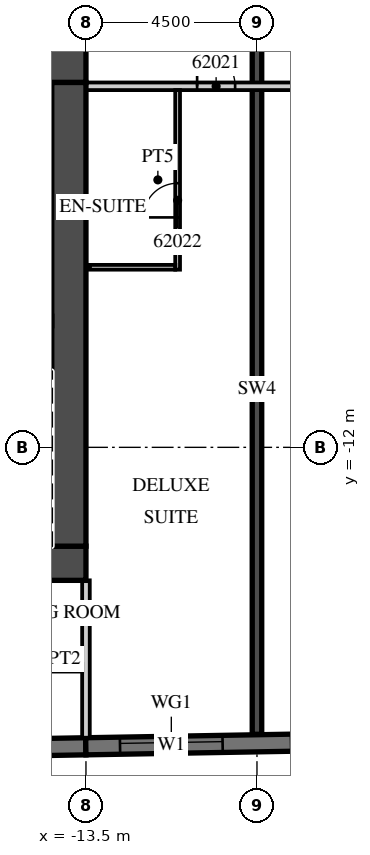
"""IFC4 building model, lengths in metres.
Left out: names, types, materials, properties, quantities, classifications, styles, units other than length and angle.
Written with IfcOpenShell. Run it as: python <this file> out.ifc"""

import sys

from ifc_helpers import new_model, si_unit, direction, frame, frame_2d, origin, place, context, subcontext, project, spatial, rectangle, extrude, element, fill, save


model = new_model("IFC4")
c1 = context("Model", 3, precision=1e-05, world=origin(), true_north=direction((0.0, 1.0)))
c2 = subcontext(c1, "Body", "Model", "MODEL_VIEW")
j1 = project(units=[si_unit("LENGTHUNIT", "METRE"), si_unit("PLANEANGLEUNIT", "RADIAN")], contexts=[c1])
p1 = place(None, origin())
s1 = spatial("IfcSite", under=j1, at=p1, CompositionType="ELEMENT")
p2 = place(p1, origin())
s2 = spatial("IfcBuilding", under=s1, at=p2, CompositionType="ELEMENT")
p3 = place(p2, frame((0.0, 0.0, 250.7)))
s3 = spatial("IfcBuildingStorey", under=s2, at=p3, CompositionType="ELEMENT", Elevation=250.7)
p4 = place(p3, frame((-9.0, -19.55, 0.0), z_axis=(0.0, 0.0, 1.0), x_axis=(0.0, 1.0, 0.0)))
e1 = element("IfcWall", 1, at=p4, inside=s3, PredefinedType="SHEAR", context=c2, shape_type="SweptSolid", body=[
    extrude(rectangle(XDim=18.15, YDim=0.25, at=frame_2d((9.075, 0.0))), origin(), (0.0, 0.0, 1.0), 3.3),
])
p5 = place(p3, frame((-31.504, -20.18, 0.0), z_axis=(0.0, 0.0, 1.0), x_axis=(0.999847677887, 0.017453395744, 0.0)))
e2 = element("IfcWall", 2, at=p5, inside=s3, PredefinedType="SOLIDWALL", context=c2, shape_type="SweptSolid", body=[
    extrude(rectangle(XDim=18.003, YDim=0.45, at=frame_2d((9.001, 0.0))), origin(), (0.0, 0.0, 1.0), 3.02),
])
p6 = place(p3, frame((-13.504, -19.866, 0.0), z_axis=(0.0, 0.0, 1.0), x_axis=(0.999847672978, 0.017453676992, 0.0)))
e3 = element("IfcWall", 3, at=p6, inside=s3, PredefinedType="SOLIDWALL", context=c2, shape_type="SweptSolid", body=[
    extrude(rectangle(XDim=52.86, YDim=0.45, at=frame_2d((26.43, 0.0))), origin(), (0.0, 0.0, 1.0), 3.02),
])
p7 = place(p6, frame((0.9, 0.0, 0.45)))
e4 = element("IfcOpeningElement", 4, at=p7, cuts=e3, PredefinedType="OPENING", context=c2, shape_type="SweptSolid", body=[
    extrude(rectangle(XDim=2.7, YDim=2.25, at=frame_2d((1.35, 1.125))), frame((0.0, 0.235, 0.0), z_axis=(0.0, -1.0, 0.0), x_axis=(1.0, 0.0, 0.0)), (0.0, 0.0, 1.0), 0.47),
])
p8 = place(p6, frame((5.401, 0.0, 0.45)))
e5 = element("IfcOpeningElement", 5, at=p8, cuts=e3, PredefinedType="OPENING", context=c2, shape_type="SweptSolid", body=[
    extrude(rectangle(XDim=2.7, YDim=2.25, at=frame_2d((1.35, 1.125))), frame((0.0, 0.235, 0.0), z_axis=(0.0, -1.0, 0.0), x_axis=(1.0, 0.0, 0.0)), (0.0, 0.0, 1.0), 0.47),
])
p9 = place(p6, frame((9.902, 0.0, 0.45)))
e6 = element("IfcOpeningElement", 6, at=p9, cuts=e3, PredefinedType="OPENING", context=c2, shape_type="SweptSolid", body=[
    extrude(rectangle(XDim=2.7, YDim=2.25, at=frame_2d((1.35, 1.125))), frame((0.0, 0.235, 0.0), z_axis=(0.0, -1.0, 0.0), x_axis=(1.0, 0.0, 0.0)), (0.0, 0.0, 1.0), 0.47),
])
p10 = place(p6, frame((14.402, 0.0, 0.45)))
e7 = element("IfcOpeningElement", 7, at=p10, cuts=e3, PredefinedType="OPENING", context=c2, shape_type="SweptSolid", body=[
    extrude(rectangle(XDim=2.7, YDim=2.25, at=frame_2d((1.35, 1.125))), frame((0.0, 0.235, 0.0), z_axis=(0.0, -1.0, 0.0), x_axis=(1.0, 0.0, 0.0)), (0.0, 0.0, 1.0), 0.47),
])
p11 = place(p6, frame((18.903, 0.0, 0.45)))
e8 = element("IfcOpeningElement", 8, at=p11, cuts=e3, PredefinedType="OPENING", context=c2, shape_type="SweptSolid", body=[
    extrude(rectangle(XDim=2.7, YDim=2.25, at=frame_2d((1.35, 1.125))), frame((0.0, 0.235, 0.0), z_axis=(0.0, -1.0, 0.0), x_axis=(1.0, 0.0, 0.0)), (0.0, 0.0, 1.0), 0.47),
])
p12 = place(p6, frame((23.404, 0.0, 0.45)))
e9 = element("IfcOpeningElement", 9, at=p12, cuts=e3, PredefinedType="OPENING", context=c2, shape_type="SweptSolid", body=[
    extrude(rectangle(XDim=2.7, YDim=2.25, at=frame_2d((1.35, 1.125))), frame((0.0, 0.235, 0.0), z_axis=(0.0, -1.0, 0.0), x_axis=(1.0, 0.0, 0.0)), (0.0, 0.0, 1.0), 0.47),
])
p13 = place(p6, frame((27.904, 0.0, 0.45)))
e10 = element("IfcOpeningElement", 10, at=p13, cuts=e3, PredefinedType="OPENING", context=c2, shape_type="SweptSolid", body=[
    extrude(rectangle(XDim=2.7, YDim=2.25, at=frame_2d((1.35, 1.125))), frame((0.0, 0.235, 0.0), z_axis=(0.0, -1.0, 0.0), x_axis=(1.0, 0.0, 0.0)), (0.0, 0.0, 1.0), 0.47),
])
p14 = place(p6, frame((32.405, 0.0, 0.45)))
e11 = element("IfcOpeningElement", 11, at=p14, cuts=e3, PredefinedType="OPENING", context=c2, shape_type="SweptSolid", body=[
    extrude(rectangle(XDim=2.7, YDim=2.25, at=frame_2d((1.35, 1.125))), frame((0.0, 0.235, 0.0), z_axis=(0.0, -1.0, 0.0), x_axis=(1.0, 0.0, 0.0)), (0.0, 0.0, 1.0), 0.47),
])
p15 = place(p6, frame((36.906, 0.0, 0.45)))
e12 = element("IfcOpeningElement", 12, at=p15, cuts=e3, PredefinedType="OPENING", context=c2, shape_type="SweptSolid", body=[
    extrude(rectangle(XDim=2.7, YDim=2.25, at=frame_2d((1.35, 1.125))), frame((0.0, 0.235, 0.0), z_axis=(0.0, -1.0, 0.0), x_axis=(1.0, 0.0, 0.0)), (0.0, 0.0, 1.0), 0.47),
])
p16 = place(p6, frame((41.406, 0.0, 0.45)))
e13 = element("IfcOpeningElement", 13, at=p16, cuts=e3, PredefinedType="OPENING", context=c2, shape_type="SweptSolid", body=[
    extrude(rectangle(XDim=2.7, YDim=2.25, at=frame_2d((1.35, 1.125))), frame((0.0, 0.235, 0.0), z_axis=(0.0, -1.0, 0.0), x_axis=(1.0, 0.0, 0.0)), (0.0, 0.0, 1.0), 0.47),
])
p17 = place(p6, frame((45.907, 0.0, 0.45)))
e14 = element("IfcOpeningElement", 14, at=p17, cuts=e3, PredefinedType="OPENING", context=c2, shape_type="SweptSolid", body=[
    extrude(rectangle(XDim=2.7, YDim=2.25, at=frame_2d((1.35, 1.125))), frame((0.0, 0.235, 0.0), z_axis=(0.0, -1.0, 0.0), x_axis=(1.0, 0.0, 0.0)), (0.0, 0.0, 1.0), 0.47),
])
p18 = place(p3, frame((-13.5, -19.641, 0.0), z_axis=(0.0, 0.0, 1.0), x_axis=(0.0, 1.0, 0.0)))
e15 = element("IfcWall", 15, at=p18, inside=s3, PredefinedType="PARTITIONING", context=c2, shape_type="SweptSolid", body=[
    extrude(rectangle(XDim=4.141, YDim=0.2, at=frame_2d((2.071, 0.0))), origin(), (0.0, 0.0, 1.0), 3.02),
])
p19 = place(p3, frame((-13.5, -2.5, 0.0), z_axis=(0.0, 0.0, 1.0), x_axis=(1.0, 0.0, 0.0)))
e16 = element("IfcWall", 16, at=p19, inside=s3, PredefinedType="PARTITIONING", context=c2, shape_type="SweptSolid", body=[
    extrude(rectangle(XDim=27.0, YDim=0.2, at=frame_2d((13.5, 0.0))), origin(), (0.0, 0.0, 1.0), 3.02),
])
p20 = place(p19, frame((2.925, 0.0, 0.0)))
e17 = element("IfcOpeningElement", 17, at=p20, cuts=e16, PredefinedType="OPENING", context=c2, shape_type="SweptSolid", body=[
    extrude(rectangle(XDim=1.0, YDim=2.1, at=frame_2d((0.5, 1.05))), frame((0.0, 0.11, 0.0), z_axis=(0.0, -1.0, 0.0), x_axis=(1.0, 0.0, 0.0)), (0.0, 0.0, 1.0), 0.22),
])
p21 = place(p19, frame((6.938, 0.0, 0.0)))
e18 = element("IfcOpeningElement", 18, at=p21, cuts=e16, PredefinedType="OPENING", context=c2, shape_type="SweptSolid", body=[
    extrude(rectangle(XDim=1.2, YDim=2.1, at=frame_2d((0.6, 1.05))), frame((0.0, 0.11, 0.0), z_axis=(0.0, -1.0, 0.0), x_axis=(1.0, 0.0, 0.0)), (0.0, 0.0, 1.0), 0.22),
])
p22 = place(p19, frame((18.862, 0.0, 0.0)))
e19 = element("IfcOpeningElement", 19, at=p22, cuts=e16, PredefinedType="OPENING", context=c2, shape_type="SweptSolid", body=[
    extrude(rectangle(XDim=1.2, YDim=2.1, at=frame_2d((0.6, 1.05))), frame((0.0, 0.11, 0.0), z_axis=(0.0, -1.0, 0.0), x_axis=(1.0, 0.0, 0.0)), (0.0, 0.0, 1.0), 0.22),
])
p23 = place(p19, frame((23.075, 0.0, 0.0)))
e20 = element("IfcOpeningElement", 20, at=p23, cuts=e16, PredefinedType="OPENING", context=c2, shape_type="SweptSolid", body=[
    extrude(rectangle(XDim=1.0, YDim=2.1, at=frame_2d((0.5, 1.05))), frame((0.0, 0.11, 0.0), z_axis=(0.0, -1.0, 0.0), x_axis=(1.0, 0.0, 0.0)), (0.0, 0.0, 1.0), 0.22),
])
p24 = place(p3, frame((-11.088, -7.325, 0.0), z_axis=(0.0, 0.0, 1.0), x_axis=(0.0, 1.0, 0.0)))
e21 = element("IfcWall", 21, at=p24, inside=s3, PredefinedType="PARTITIONING", context=c2, shape_type="SweptSolid", body=[
    extrude(rectangle(XDim=4.725, YDim=0.125, at=frame_2d((2.362, 0.0))), origin(), (0.0, 0.0, 1.0), 3.02),
])
p25 = place(p24, frame((1.375, 0.0, 0.0)))
e22 = element("IfcOpeningElement", 22, at=p25, cuts=e21, PredefinedType="OPENING", context=c2, shape_type="SweptSolid", body=[
    extrude(rectangle(XDim=0.9, YDim=2.1, at=frame_2d((0.45, 1.05))), frame((0.0, 0.073, 0.0), z_axis=(0.0, -1.0, 0.0), x_axis=(1.0, 0.0, 0.0)), (0.0, 0.0, 1.0), 0.145),
])
p26 = place(p3, frame((-13.4, -7.262, 0.0), z_axis=(0.0, 0.0, 1.0), x_axis=(1.0, 0.0, 0.0)))
e23 = element("IfcWall", 23, at=p26, inside=s3, PredefinedType="PARTITIONING", context=c2, shape_type="SweptSolid", body=[
    extrude(rectangle(XDim=2.25, YDim=0.125, at=frame_2d((1.125, 0.0))), origin(), (0.0, 0.0, 1.0), 3.02),
])
p27 = place(p3, frame((-31.5, -1.95, 0.0), z_axis=(0.0, 0.0, 1.0), x_axis=(1.0, 0.0, 0.0)))
e24 = element("IfcWall", 24, at=p27, inside=s3, PredefinedType="SHEAR", context=c2, shape_type="SweptSolid", body=[
    extrude(rectangle(XDim=18.0, YDim=0.9, at=frame_2d((9.0, 0.0))), origin(), (0.0, 0.0, 1.0), 3.02),
])
p28 = place(p27, frame((14.725, 0.0, 0.0)))
e25 = element("IfcOpeningElement", 25, at=p28, cuts=e24, PredefinedType="OPENING", context=c2, shape_type="SweptSolid", body=[
    extrude(rectangle(XDim=1.8, YDim=2.1, at=frame_2d((0.9, 1.05))), frame((0.0, 0.46, 0.0), z_axis=(0.0, -1.0, 0.0), x_axis=(1.0, 0.0, 0.0)), (0.0, 0.0, 1.0), 0.92),
])
p29 = place(p3, frame((-20.3, -15.05, 0.0), z_axis=(0.0, 0.0, 1.0), x_axis=(1.0, 0.0, 0.0)))
e26 = element("IfcWall", 26, at=p29, inside=s3, PredefinedType="SHEAR", context=c2, shape_type="SweptSolid", body=[
    extrude(rectangle(XDim=6.8, YDim=0.9, at=frame_2d((3.4, 0.0))), origin(), (0.0, 0.0, 1.0), 3.02),
])
p30 = place(p29, frame((0.875, 0.0, 0.0)))
e27 = element("IfcOpeningElement", 27, at=p30, cuts=e26, PredefinedType="OPENING", context=c2, shape_type="SweptSolid", body=[
    extrude(rectangle(XDim=1.2, YDim=2.1, at=frame_2d((0.6, 1.05))), frame((0.0, 0.46, 0.0), z_axis=(0.0, -1.0, 0.0), x_axis=(1.0, 0.0, 0.0)), (0.0, 0.0, 1.0), 0.92),
])
p31 = place(p3, frame((-13.95, -14.6, 0.0), z_axis=(0.0, 0.0, 1.0), x_axis=(0.0, 1.0, 0.0)))
e28 = element("IfcWall", 28, at=p31, inside=s3, PredefinedType="SHEAR", context=c2, shape_type="SweptSolid", body=[
    extrude(rectangle(XDim=12.2, YDim=0.9, at=frame_2d((6.1, 0.0))), origin(), (0.0, 0.0, 1.0), 3.02),
])
p32 = place(p3, frame((-35.864, -17.8, 0.0), z_axis=(0.0, 0.0, 1.0), x_axis=(1.0, 0.0, 0.0)))
e29 = element("IfcWall", 29, at=p32, inside=s3, PredefinedType="PARTITIONING", context=c2, shape_type="SweptSolid", body=[
    extrude(rectangle(XDim=22.264, YDim=0.2, at=frame_2d((11.132, 0.0))), origin(), (0.0, 0.0, 1.0), 3.02),
])
p33 = place(p32, frame((3.551, 0.0, 0.0)))
e30 = element("IfcOpeningElement", 30, at=p33, cuts=e29, PredefinedType="OPENING", context=c2, shape_type="SweptSolid", body=[
    extrude(rectangle(XDim=0.9, YDim=2.1, at=frame_2d((0.45, 1.05))), frame((0.0, 0.11, 0.0), z_axis=(0.0, -1.0, 0.0), x_axis=(1.0, 0.0, 0.0)), (0.0, 0.0, 1.0), 0.22),
])
p34 = place(p32, frame((11.851, 0.0, 0.0)))
e31 = element("IfcOpeningElement", 31, at=p34, cuts=e29, PredefinedType="OPENING", context=c2, shape_type="SweptSolid", body=[
    extrude(rectangle(XDim=0.9, YDim=2.1, at=frame_2d((0.45, 1.05))), frame((0.0, 0.11, 0.0), z_axis=(0.0, -1.0, 0.0), x_axis=(1.0, 0.0, 0.0)), (0.0, 0.0, 1.0), 0.22),
])
p35 = place(p7, origin())
e32 = element("IfcWindow", 32, at=p35, inside=s3, PartitioningType="SINGLE_PANEL", PredefinedType="WINDOW", context=c2, shape_type="SweptSolid", body=[
    extrude(rectangle(XDim=2.7, YDim=2.25, at=frame_2d((1.35, 1.125))), frame((0.0, 0.09, 0.0), z_axis=(0.0, -1.0, 0.0), x_axis=(1.0, 0.0, 0.0)), (0.0, 0.0, 1.0), 0.06),
])
fill(e4, e32)
p36 = place(p20, origin())
e33 = element("IfcDoor", 33, at=p36, inside=s3, OperationType="SINGLE_SWING_LEFT", PredefinedType="DOOR", context=c2, shape_type="SweptSolid", body=[
    extrude(rectangle(XDim=1.0, YDim=2.1, at=frame_2d((0.5, 1.05))), frame((0.0, 0.025, 0.0), z_axis=(0.0, -1.0, 0.0), x_axis=(1.0, 0.0, 0.0)), (0.0, 0.0, 1.0), 0.05),
])
fill(e17, e33)
p37 = place(p25, origin())
e34 = element("IfcDoor", 34, at=p37, inside=s3, OperationType="SINGLE_SWING_LEFT", PredefinedType="DOOR", context=c2, shape_type="SweptSolid", body=[
    extrude(rectangle(XDim=0.9, YDim=2.1, at=frame_2d((0.45, 1.05))), frame((0.0, 0.025, 0.0), z_axis=(0.0, -1.0, 0.0), x_axis=(1.0, 0.0, 0.0)), (0.0, 0.0, 1.0), 0.05),
])
fill(e22, e34)
save(model, sys.argv[1])
